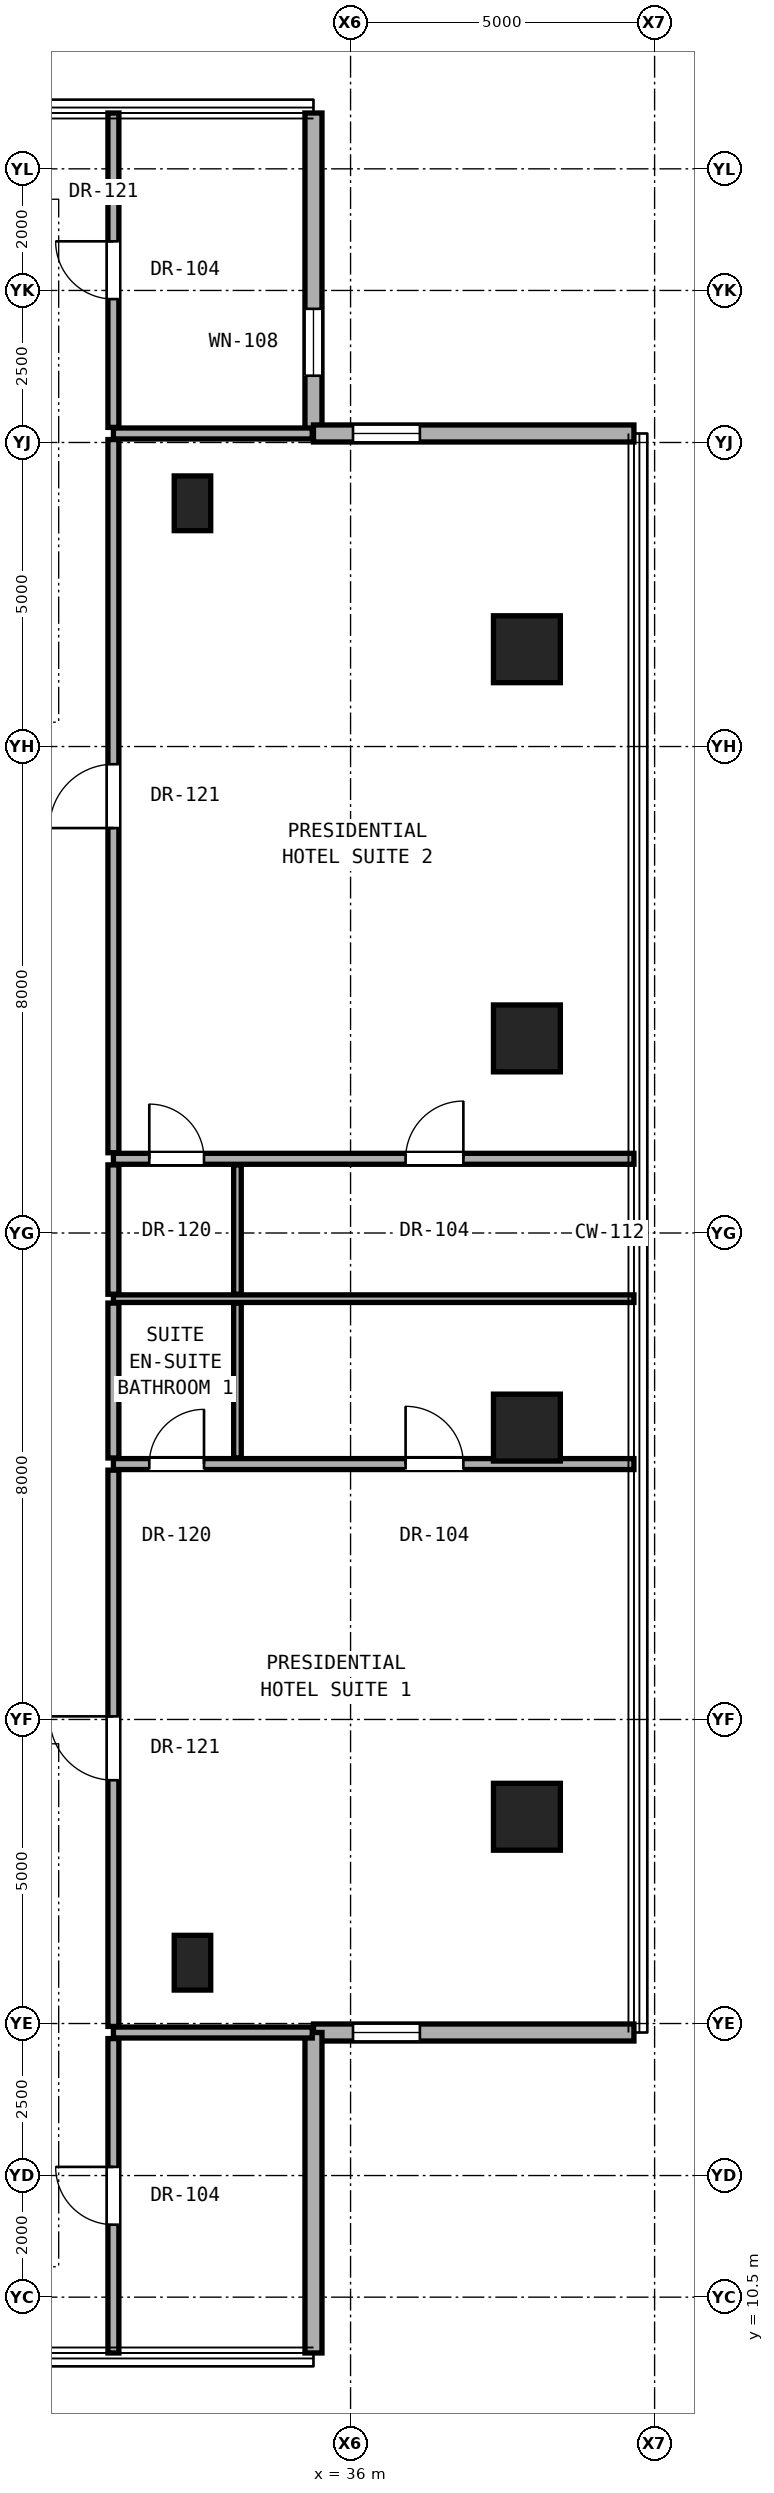
"""IFC4 building model, lengths in metres.
Left out: names, types, materials, properties, quantities, classifications, styles, units other than length and angle.
Written with IfcOpenShell. Run it as: python <this file> out.ifc"""

import sys

from ifc_helpers import new_model, si_unit, direction, frame, frame_2d, origin, origin_2d, place, context, subcontext, project, spatial, rectangle, hollow_rectangle, extrude, element, fill, save


model = new_model("IFC4")
c1 = context("Model", 3, precision=1e-05, world=origin(), true_north=direction((0.0, 1.0)))
c2 = subcontext(c1, "Body", "Model", "MODEL_VIEW")
j1 = project(units=[si_unit("LENGTHUNIT", "METRE"), si_unit("PLANEANGLEUNIT", "RADIAN")], contexts=[c1])
p1 = place(None, origin())
s1 = spatial("IfcSite", under=j1, at=p1, CompositionType="ELEMENT")
p2 = place(p1, origin())
s2 = spatial("IfcBuilding", under=s1, at=p2, CompositionType="ELEMENT")
p3 = place(p2, frame((0.0, 0.0, 121.4)))
s3 = spatial("IfcBuildingStorey", under=s2, at=p3, CompositionType="ELEMENT", Elevation=121.4)
for number, where, z_axis, x_axis in (
    (1, (38.9, 18.4, 0.0), (0.0, 0.0, 1.0), (1.0, 0.0, 0.0)),
    (2, (38.9, 24.8, 0.0), (0.0, 0.0, 1.0), (1.0, 0.0, 0.0)),
    (3, (38.9, 31.2, 0.0), (0.0, 0.0, 1.0), (1.0, 0.0, 0.0)),
    (4, (38.9, 37.6, 0.0), (0.0, 0.0, 1.0), (1.0, 0.0, 0.0)),
):
    element("IfcColumn", number, at=place(p3, frame(where, z_axis=z_axis, x_axis=x_axis)), inside=s3, PredefinedType="COLUMN", context=c2, shape_type="SweptSolid", body=[
        extrude(hollow_rectangle(XDim=1.1, YDim=1.1, WallThickness=0.06, at=origin_2d()), origin(), (0.0, 0.0, 1.0), 3.3),
    ])
for number, where, z_axis, x_axis in (
    (5, (33.4, 16.0, 0.0), (0.0, 0.0, 1.0), (1.0, 0.0, 0.0)),
    (6, (33.4, 40.0, 0.0), (0.0, 0.0, 1.0), (1.0, 0.0, 0.0)),
):
    element("IfcColumn", number, at=place(p3, frame(where, z_axis=z_axis, x_axis=x_axis)), inside=s3, PredefinedType="PILASTER", context=c2, shape_type="SweptSolid", body=[
        extrude(rectangle(XDim=0.6, YDim=0.9, at=origin_2d()), origin(), (0.0, 0.0, 1.0), 3.3),
    ])
p4 = place(p3, frame((35.39, 41.148, 0.0), z_axis=(0.0, 0.0, 1.0), x_axis=(0.0, 1.0, 0.0)))
e7 = element("IfcWall", 7, at=p4, inside=s3, PredefinedType="SOLIDWALL", context=c2, shape_type="SweptSolid", body=[
    extrude(rectangle(XDim=5.27, YDim=0.28, at=frame_2d((2.635, 0.0))), origin(), (0.0, 0.0, 1.0), 3.06),
])
p5 = place(p4, frame((0.95, 0.0, 0.85)))
e8 = element("IfcOpeningElement", 8, at=p5, cuts=e7, PredefinedType="OPENING", context=c2, shape_type="SweptSolid", body=[
    extrude(rectangle(XDim=1.1, YDim=2.0, at=frame_2d((0.55, 1.0))), frame((0.0, 0.15, 0.0), z_axis=(0.0, -1.0, 0.0), x_axis=(1.0, 0.0, 0.0)), (0.0, 0.0, 1.0), 0.3),
])
p6 = place(p3, frame((35.39, 14.852, 0.0), z_axis=(0.0, 0.0, 1.0), x_axis=(1.0, 0.0, 0.0)))
e9 = element("IfcWall", 9, at=p6, inside=s3, PredefinedType="SOLIDWALL", context=c2, shape_type="SweptSolid", body=[
    extrude(rectangle(XDim=5.27, YDim=0.28, at=frame_2d((2.635, 0.0))), origin(), (0.0, 0.0, 1.0), 3.06),
])
p7 = place(p6, frame((0.65, 0.0, 0.85)))
e10 = element("IfcOpeningElement", 10, at=p7, cuts=e9, PredefinedType="OPENING", context=c2, shape_type="SweptSolid", body=[
    extrude(rectangle(XDim=1.1, YDim=2.0, at=frame_2d((0.55, 1.0))), frame((0.0, 0.15, 0.0), z_axis=(0.0, -1.0, 0.0), x_axis=(1.0, 0.0, 0.0)), (0.0, 0.0, 1.0), 0.3),
])
p8 = place(p3, frame((35.39, 9.582, 0.0), z_axis=(0.0, 0.0, 1.0), x_axis=(0.0, 1.0, 0.0)))
e11 = element("IfcWall", 11, at=p8, inside=s3, PredefinedType="SOLIDWALL", context=c2, shape_type="SweptSolid", body=[
    extrude(rectangle(XDim=5.27, YDim=0.28, at=frame_2d((2.635, 0.0))), origin(), (0.0, 0.0, 1.0), 3.06),
])
p9 = place(p3, frame((40.66, 41.148, 0.0), z_axis=(0.0, 0.0, 1.0), x_axis=(-1.0, 0.0, 0.0)))
e12 = element("IfcWall", 12, at=p9, inside=s3, PredefinedType="SOLIDWALL", context=c2, shape_type="SweptSolid", body=[
    extrude(rectangle(XDim=5.27, YDim=0.28, at=frame_2d((2.635, 0.0))), origin(), (0.0, 0.0, 1.0), 3.06),
])
p10 = place(p9, frame((3.52, 0.0, 0.85)))
e13 = element("IfcOpeningElement", 13, at=p10, cuts=e12, PredefinedType="OPENING", context=c2, shape_type="SweptSolid", body=[
    extrude(rectangle(XDim=1.1, YDim=2.0, at=frame_2d((0.55, 1.0))), frame((0.0, 0.15, 0.0), z_axis=(0.0, -1.0, 0.0), x_axis=(1.0, 0.0, 0.0)), (0.0, 0.0, 1.0), 0.3),
])
p11 = place(p3, frame((32.1, 14.852, 0.0), z_axis=(0.0, 0.0, 1.0), x_axis=(1.0, 0.0, 0.0)))
e14 = element("IfcWall", 14, at=p11, inside=s3, PredefinedType="PARTITIONING", context=c2, shape_type="SweptSolid", body=[
    extrude(rectangle(XDim=3.27, YDim=0.18, at=frame_2d((1.635, 0.0))), origin(), (0.0, 0.0, 1.0), 3.08),
])
p12 = place(p3, frame((32.1, 24.2, 0.0), z_axis=(0.0, 0.0, 1.0), x_axis=(1.0, 0.0, 0.0)))
e15 = element("IfcWall", 15, at=p12, inside=s3, PredefinedType="PARTITIONING", context=c2, shape_type="SweptSolid", body=[
    extrude(rectangle(XDim=8.56, YDim=0.18, at=frame_2d((4.28, 0.0))), origin(), (0.0, 0.0, 1.0), 2.299),
])
p13 = place(p12, frame((4.805, 0.0, 0.0)))
e16 = element("IfcOpeningElement", 16, at=p13, cuts=e15, PredefinedType="OPENING", context=c2, shape_type="SweptSolid", body=[
    extrude(rectangle(XDim=0.95, YDim=2.15, at=frame_2d((0.475, 1.075))), frame((0.0, 0.1, 0.0), z_axis=(0.0, -1.0, 0.0), x_axis=(1.0, 0.0, 0.0)), (0.0, 0.0, 1.0), 0.2),
])
p14 = place(p12, frame((0.59, 0.0, 0.0)))
e17 = element("IfcOpeningElement", 17, at=p14, cuts=e15, PredefinedType="OPENING", context=c2, shape_type="SweptSolid", body=[
    extrude(rectangle(XDim=0.9, YDim=2.1, at=frame_2d((0.45, 1.05))), frame((0.0, 0.1, 0.0), z_axis=(0.0, -1.0, 0.0), x_axis=(1.0, 0.0, 0.0)), (0.0, 0.0, 1.0), 0.2),
])
p15 = place(p3, frame((32.1, 26.92, 0.0), z_axis=(0.0, 0.0, 1.0), x_axis=(1.0, 0.0, 0.0)))
e18 = element("IfcWall", 18, at=p15, inside=s3, PredefinedType="PARTITIONING", context=c2, shape_type="SweptSolid", body=[
    extrude(rectangle(XDim=8.56, YDim=0.125, at=frame_2d((4.28, 0.0))), origin(), (0.0, 0.0, 1.0), 2.299),
])
p16 = place(p3, frame((32.1, 29.22, 0.0), z_axis=(0.0, 0.0, 1.0), x_axis=(1.0, 0.0, 0.0)))
e19 = element("IfcWall", 19, at=p16, inside=s3, PredefinedType="PARTITIONING", context=c2, shape_type="SweptSolid", body=[
    extrude(rectangle(XDim=8.56, YDim=0.18, at=frame_2d((4.28, 0.0))), origin(), (0.0, 0.0, 1.0), 2.299),
])
p17 = place(p16, frame((4.805, 0.0, 0.0)))
e20 = element("IfcOpeningElement", 20, at=p17, cuts=e19, PredefinedType="OPENING", context=c2, shape_type="SweptSolid", body=[
    extrude(rectangle(XDim=0.95, YDim=2.15, at=frame_2d((0.475, 1.075))), frame((0.0, 0.1, 0.0), z_axis=(0.0, -1.0, 0.0), x_axis=(1.0, 0.0, 0.0)), (0.0, 0.0, 1.0), 0.2),
])
p18 = place(p16, frame((0.59, 0.0, 0.0)))
e21 = element("IfcOpeningElement", 21, at=p18, cuts=e19, PredefinedType="OPENING", context=c2, shape_type="SweptSolid", body=[
    extrude(rectangle(XDim=0.9, YDim=2.1, at=frame_2d((0.45, 1.05))), frame((0.0, 0.1, 0.0), z_axis=(0.0, -1.0, 0.0), x_axis=(1.0, 0.0, 0.0)), (0.0, 0.0, 1.0), 0.2),
])
p19 = place(p3, frame((32.1, 41.148, 0.0), z_axis=(0.0, 0.0, 1.0), x_axis=(1.0, 0.0, 0.0)))
e22 = element("IfcWall", 22, at=p19, inside=s3, PredefinedType="PARTITIONING", context=c2, shape_type="SweptSolid", body=[
    extrude(rectangle(XDim=3.27, YDim=0.18, at=frame_2d((1.635, 0.0))), origin(), (0.0, 0.0, 1.0), 3.08),
])
p20 = place(p3, frame((32.1, 9.582, 0.0), z_axis=(0.0, 0.0, 1.0), x_axis=(0.0, 1.0, 0.0)))
e23 = element("IfcWall", 23, at=p20, inside=s3, PredefinedType="PARTITIONING", context=c2, shape_type="SweptSolid", body=[
    extrude(rectangle(XDim=5.17, YDim=0.18, at=frame_2d((2.585, 0.0))), origin(), (0.0, 0.0, 1.0), 3.08),
])
p21 = place(p20, frame((2.11, 0.0, 0.0)))
e24 = element("IfcOpeningElement", 24, at=p21, cuts=e23, PredefinedType="OPENING", context=c2, shape_type="SweptSolid", body=[
    extrude(rectangle(XDim=0.95, YDim=2.15, at=frame_2d((0.475, 1.075))), frame((0.0, 0.1, 0.0), z_axis=(0.0, -1.0, 0.0), x_axis=(1.0, 0.0, 0.0)), (0.0, 0.0, 1.0), 0.2),
])
p22 = place(p3, frame((32.1, 14.952, 0.0), z_axis=(0.0, 0.0, 1.0), x_axis=(0.0, 1.0, 0.0)))
e25 = element("IfcWall", 25, at=p22, inside=s3, PredefinedType="PARTITIONING", context=c2, shape_type="SweptSolid", body=[
    extrude(rectangle(XDim=9.148, YDim=0.18, at=frame_2d((4.574, 0.0))), origin(), (0.0, 0.0, 1.0), 2.456),
])
p23 = place(p22, frame((4.049, 0.0, 0.0)))
e26 = element("IfcOpeningElement", 26, at=p23, cuts=e25, PredefinedType="OPENING", context=c2, shape_type="SweptSolid", body=[
    extrude(rectangle(XDim=1.05, YDim=2.2, at=frame_2d((0.525, 1.1))), frame((0.0, 0.1, 0.0), z_axis=(0.0, -1.0, 0.0), x_axis=(1.0, 0.0, 0.0)), (0.0, 0.0, 1.0), 0.2),
])
p24 = place(p3, frame((32.1, 24.3, 0.0), z_axis=(0.0, 0.0, 1.0), x_axis=(0.0, 1.0, 0.0)))
e27 = element("IfcWall", 27, at=p24, inside=s3, PredefinedType="PARTITIONING", context=c2, shape_type="SweptSolid", body=[
    extrude(rectangle(XDim=2.547, YDim=0.18, at=frame_2d((1.274, 0.0))), origin(), (0.0, 0.0, 1.0), 2.299),
])
p25 = place(p3, frame((32.1, 26.992, 0.0), z_axis=(0.0, 0.0, 1.0), x_axis=(0.0, 1.0, 0.0)))
e28 = element("IfcWall", 28, at=p25, inside=s3, PredefinedType="PARTITIONING", context=c2, shape_type="SweptSolid", body=[
    extrude(rectangle(XDim=2.128, YDim=0.18, at=frame_2d((1.064, 0.0))), origin(), (0.0, 0.0, 1.0), 3.08),
])
p26 = place(p3, frame((32.1, 29.32, 0.0), z_axis=(0.0, 0.0, 1.0), x_axis=(0.0, 1.0, 0.0)))
e29 = element("IfcWall", 29, at=p26, inside=s3, PredefinedType="PARTITIONING", context=c2, shape_type="SweptSolid", body=[
    extrude(rectangle(XDim=11.728, YDim=0.18, at=frame_2d((5.864, 0.0))), origin(), (0.0, 0.0, 1.0), 2.299),
])
p27 = place(p26, frame((5.339, 0.0, 0.0)))
e30 = element("IfcOpeningElement", 30, at=p27, cuts=e29, PredefinedType="OPENING", context=c2, shape_type="SweptSolid", body=[
    extrude(rectangle(XDim=1.05, YDim=2.2, at=frame_2d((0.525, 1.1))), frame((0.0, 0.1, 0.0), z_axis=(0.0, -1.0, 0.0), x_axis=(1.0, 0.0, 0.0)), (0.0, 0.0, 1.0), 0.2),
])
p28 = place(p3, frame((32.1, 41.248, 0.0), z_axis=(0.0, 0.0, 1.0), x_axis=(0.0, 1.0, 0.0)))
e31 = element("IfcWall", 31, at=p28, inside=s3, PredefinedType="PARTITIONING", context=c2, shape_type="SweptSolid", body=[
    extrude(rectangle(XDim=5.17, YDim=0.18, at=frame_2d((2.585, 0.0))), origin(), (0.0, 0.0, 1.0), 3.08),
])
p29 = place(p28, frame((2.11, 0.0, 0.0)))
e32 = element("IfcOpeningElement", 32, at=p29, cuts=e31, PredefinedType="OPENING", context=c2, shape_type="SweptSolid", body=[
    extrude(rectangle(XDim=0.95, YDim=2.15, at=frame_2d((0.475, 1.075))), frame((0.0, 0.1, 0.0), z_axis=(0.0, -1.0, 0.0), x_axis=(1.0, 0.0, 0.0)), (0.0, 0.0, 1.0), 0.2),
])
p30 = place(p3, frame((34.14, 24.3, 0.0), z_axis=(0.0, 0.0, 1.0), x_axis=(0.0, 1.0, 0.0)))
e33 = element("IfcWall", 33, at=p30, inside=s3, PredefinedType="PARTITIONING", context=c2, shape_type="SweptSolid", body=[
    extrude(rectangle(XDim=2.547, YDim=0.125, at=frame_2d((1.274, 0.0))), origin(), (0.0, 0.0, 1.0), 2.299),
])
p31 = place(p3, frame((34.14, 26.992, 0.0), z_axis=(0.0, 0.0, 1.0), x_axis=(0.0, 1.0, 0.0)))
e34 = element("IfcWall", 34, at=p31, inside=s3, PredefinedType="PARTITIONING", context=c2, shape_type="SweptSolid", body=[
    extrude(rectangle(XDim=2.128, YDim=0.125, at=frame_2d((1.064, 0.0))), origin(), (0.0, 0.0, 1.0), 3.08),
])
p32 = place(p5, origin())
e35 = element("IfcWindow", 35, at=p32, inside=s3, PartitioningType="SINGLE_PANEL", PredefinedType="WINDOW", context=c2, shape_type="SweptSolid", body=[
    extrude(rectangle(XDim=1.1, YDim=2.0, at=frame_2d((0.55, 1.0))), frame((0.0, 0.03, 0.0), z_axis=(0.0, -1.0, 0.0), x_axis=(1.0, 0.0, 0.0)), (0.0, 0.0, 1.0), 0.06),
])
fill(e8, e35)
p33 = place(p7, origin())
e36 = element("IfcWindow", 36, at=p33, inside=s3, PartitioningType="SINGLE_PANEL", PredefinedType="WINDOW", context=c2, shape_type="SweptSolid", body=[
    extrude(rectangle(XDim=1.1, YDim=2.0, at=frame_2d((0.55, 1.0))), frame((0.0, 0.03, 0.0), z_axis=(0.0, -1.0, 0.0), x_axis=(1.0, 0.0, 0.0)), (0.0, 0.0, 1.0), 0.06),
])
fill(e10, e36)
p34 = place(p10, origin())
e37 = element("IfcWindow", 37, at=p34, inside=s3, PartitioningType="SINGLE_PANEL", PredefinedType="WINDOW", context=c2, shape_type="SweptSolid", body=[
    extrude(rectangle(XDim=1.1, YDim=2.0, at=frame_2d((0.55, 1.0))), frame((0.0, 0.03, 0.0), z_axis=(0.0, -1.0, 0.0), x_axis=(1.0, 0.0, 0.0)), (0.0, 0.0, 1.0), 0.06),
])
fill(e13, e37)
p35 = place(p23, origin())
e38 = element("IfcDoor", 38, at=p35, inside=s3, OperationType="SINGLE_SWING_RIGHT", PredefinedType="DOOR", context=c2, shape_type="SweptSolid", body=[
    extrude(rectangle(XDim=1.05, YDim=2.2, at=frame_2d((0.525, 1.1))), frame((0.0, 0.025, 0.0), z_axis=(0.0, -1.0, 0.0), x_axis=(1.0, 0.0, 0.0)), (0.0, 0.0, 1.0), 0.05),
])
fill(e26, e38)
p36 = place(p13, origin())
e39 = element("IfcDoor", 39, at=p36, inside=s3, OperationType="SINGLE_SWING_LEFT", PredefinedType="DOOR", context=c2, shape_type="SweptSolid", body=[
    extrude(rectangle(XDim=0.95, YDim=2.15, at=frame_2d((0.475, 1.075))), frame((0.0, 0.025, 0.0), z_axis=(0.0, -1.0, 0.0), x_axis=(1.0, 0.0, 0.0)), (0.0, 0.0, 1.0), 0.05),
])
fill(e16, e39)
p37 = place(p14, origin())
e40 = element("IfcDoor", 40, at=p37, inside=s3, OperationType="SINGLE_SWING_RIGHT", PredefinedType="DOOR", context=c2, shape_type="SweptSolid", body=[
    extrude(rectangle(XDim=0.9, YDim=2.1, at=frame_2d((0.45, 1.05))), frame((0.0, 0.025, 0.0), z_axis=(0.0, -1.0, 0.0), x_axis=(1.0, 0.0, 0.0)), (0.0, 0.0, 1.0), 0.05),
])
fill(e17, e40)
p38 = place(p27, origin())
e41 = element("IfcDoor", 41, at=p38, inside=s3, OperationType="SINGLE_SWING_LEFT", PredefinedType="DOOR", context=c2, shape_type="SweptSolid", body=[
    extrude(rectangle(XDim=1.05, YDim=2.2, at=frame_2d((0.525, 1.1))), frame((0.0, 0.025, 0.0), z_axis=(0.0, -1.0, 0.0), x_axis=(1.0, 0.0, 0.0)), (0.0, 0.0, 1.0), 0.05),
])
fill(e30, e41)
p39 = place(p17, origin())
e42 = element("IfcDoor", 42, at=p39, inside=s3, OperationType="SINGLE_SWING_RIGHT", PredefinedType="DOOR", context=c2, shape_type="SweptSolid", body=[
    extrude(rectangle(XDim=0.95, YDim=2.15, at=frame_2d((0.475, 1.075))), frame((0.0, 0.025, 0.0), z_axis=(0.0, -1.0, 0.0), x_axis=(1.0, 0.0, 0.0)), (0.0, 0.0, 1.0), 0.05),
])
fill(e20, e42)
p40 = place(p18, origin())
e43 = element("IfcDoor", 43, at=p40, inside=s3, OperationType="SINGLE_SWING_LEFT", PredefinedType="DOOR", context=c2, shape_type="SweptSolid", body=[
    extrude(rectangle(XDim=0.9, YDim=2.1, at=frame_2d((0.45, 1.05))), frame((0.0, 0.025, 0.0), z_axis=(0.0, -1.0, 0.0), x_axis=(1.0, 0.0, 0.0)), (0.0, 0.0, 1.0), 0.05),
])
fill(e21, e43)
p41 = place(p21, origin())
e44 = element("IfcDoor", 44, at=p41, inside=s3, OperationType="SINGLE_SWING_RIGHT", PredefinedType="DOOR", context=c2, shape_type="SweptSolid", body=[
    extrude(rectangle(XDim=0.95, YDim=2.15, at=frame_2d((0.475, 1.075))), frame((0.0, 0.025, 0.0), z_axis=(0.0, -1.0, 0.0), x_axis=(1.0, 0.0, 0.0)), (0.0, 0.0, 1.0), 0.05),
])
fill(e24, e44)
p42 = place(p29, origin())
e45 = element("IfcDoor", 45, at=p42, inside=s3, OperationType="SINGLE_SWING_RIGHT", PredefinedType="DOOR", context=c2, shape_type="SweptSolid", body=[
    extrude(rectangle(XDim=0.95, YDim=2.15, at=frame_2d((0.475, 1.075))), frame((0.0, 0.025, 0.0), z_axis=(0.0, -1.0, 0.0), x_axis=(1.0, 0.0, 0.0)), (0.0, 0.0, 1.0), 0.05),
])
fill(e32, e45)
save(model, sys.argv[1])
